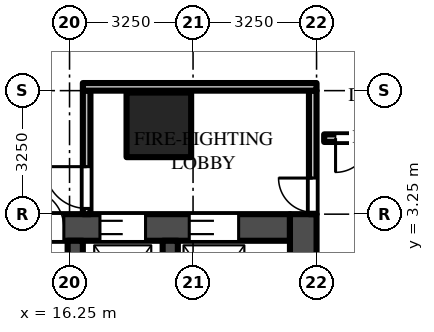
"""IFC4 building model, lengths in metres.
Left out: names, types, materials, properties, quantities, classifications, styles, units other than length and angle.
Written with IfcOpenShell. Run it as: python <this file> out.ifc"""

import sys

from ifc_helpers import new_model, si_unit, direction, frame, frame_2d, origin, origin_2d, place, context, subcontext, project, spatial, rectangle, extrude, source, transform, mapped, element, fill, save


model = new_model("IFC4")
c1 = context("Model", 3, precision=1e-05, world=origin(), true_north=direction((0.0, 1.0)))
c2 = subcontext(c1, "Body", "Model", "MODEL_VIEW")
j1 = project(units=[si_unit("LENGTHUNIT", "METRE"), si_unit("PLANEANGLEUNIT", "RADIAN")], contexts=[c1])
p1 = place(None, origin())
s1 = spatial("IfcSite", under=j1, at=p1, CompositionType="ELEMENT")
p2 = place(p1, origin())
s2 = spatial("IfcBuilding", under=s1, at=p2, CompositionType="ELEMENT")
p3 = place(p2, frame((0.0, 0.0, 8.0)))
s3 = spatial("IfcBuildingStorey", under=s2, at=p3, CompositionType="ELEMENT", Elevation=8.0)
m1 = source(origin(), c2, "Body", "SweptSolid", [
    extrude(rectangle(XDim=1.7, YDim=1.7, at=origin_2d()), origin(), (0.0, 0.0, 1.0), 6.0),
])
p4 = place(p3, frame((18.6, 5.6, 0.0), z_axis=(0.0, 0.0, 1.0), x_axis=(1.0, 0.0, 0.0)))
e1 = element("IfcColumn", 1, at=p4, inside=s3, PredefinedType="COLUMN", context=c2, shape_type="MappedRepresentation", body=[
    mapped(m1, transform((0.0, 0.0, 0.0))),
])
m2 = source(origin(), c2, "Body", "SweptSolid", [
    extrude(rectangle(XDim=14.85, YDim=0.7, at=frame_2d((7.425, 0.0))), origin(), (0.0, 0.0, 1.0), 5.7),
])
p5 = place(p3, frame((7.2, 2.9, 0.0), z_axis=(0.0, 0.0, 1.0), x_axis=(1.0, 0.0, 0.0)))
e2 = element("IfcWall", 2, at=p5, inside=s3, PredefinedType="SHEAR", context=c2, shape_type="MappedRepresentation", body=[
    mapped(m2, transform((0.0, 0.0, 0.0))),
])
m3 = source(origin(), c2, "Body", "SweptSolid", [
    extrude(rectangle(XDim=1.3, YDim=2.1, at=frame_2d((0.65, 1.05))), frame((0.0, 0.36, 0.0), z_axis=(0.0, -1.0, 0.0), x_axis=(1.0, 0.0, 0.0)), (0.0, 0.0, 1.0), 0.72),
])
p6 = place(p5, frame((12.2, 0.0, 0.0)))
e3 = element("IfcOpeningElement", 3, at=p6, cuts=e2, PredefinedType="OPENING", context=c2, shape_type="MappedRepresentation", body=[
    mapped(m3, transform((0.0, 0.0, 0.0))),
])
m4 = source(origin(), c2, "Body", "SweptSolid", [
    extrude(rectangle(XDim=1.2, YDim=2.1, at=frame_2d((0.6, 1.05))), frame((0.0, 0.36, 0.0), z_axis=(0.0, -1.0, 0.0), x_axis=(1.0, 0.0, 0.0)), (0.0, 0.0, 1.0), 0.72),
])
p7 = place(p5, frame((9.85, 0.0, 0.0)))
e4 = element("IfcOpeningElement", 4, at=p7, cuts=e2, PredefinedType="OPENING", context=c2, shape_type="MappedRepresentation", body=[
    mapped(m4, transform((0.0, 0.0, 0.0))),
])
m5 = source(origin(), c2, "Body", "SweptSolid", [
    extrude(rectangle(XDim=1.0, YDim=2.1, at=frame_2d((0.5, 1.05))), frame((0.0, 0.36, 0.0), z_axis=(0.0, -1.0, 0.0), x_axis=(1.0, 0.0, 0.0)), (0.0, 0.0, 1.0), 0.72),
])
p8 = place(p5, frame((7.9, 0.0, 0.0)))
e5 = element("IfcOpeningElement", 5, at=p8, cuts=e2, PredefinedType="OPENING", context=c2, shape_type="MappedRepresentation", body=[
    mapped(m5, transform((0.0, 0.0, 0.0))),
])
p9 = place(p5, frame((0.6, 0.0, 0.0)))
e6 = element("IfcOpeningElement", 6, at=p9, cuts=e2, PredefinedType="OPENING", context=c2, shape_type="MappedRepresentation", body=[
    mapped(m5, transform((0.0, 0.0, 0.0))),
])
m6 = source(origin(), c2, "Body", "SweptSolid", [
    extrude(rectangle(XDim=0.9, YDim=2.1, at=frame_2d((0.45, 1.05))), frame((0.0, 0.36, 0.0), z_axis=(0.0, -1.0, 0.0), x_axis=(1.0, 0.0, 0.0)), (0.0, 0.0, 1.0), 0.72),
])
p10 = place(p5, frame((3.25, 0.0, 0.0)))
e7 = element("IfcOpeningElement", 7, at=p10, cuts=e2, PredefinedType="OPENING", context=c2, shape_type="MappedRepresentation", body=[
    mapped(m6, transform((0.0, 0.0, 0.0))),
])
p11 = place(p5, frame((5.85, 0.0, 0.0)))
e8 = element("IfcOpeningElement", 8, at=p11, cuts=e2, PredefinedType="OPENING", context=c2, shape_type="MappedRepresentation", body=[
    mapped(m6, transform((0.0, 0.0, 0.0))),
])
m7 = source(origin(), c2, "Body", "SweptSolid", [
    extrude(rectangle(XDim=9.05, YDim=0.7, at=frame_2d((4.525, 0.0))), origin(), (0.0, 0.0, 1.0), 5.7),
])
p12 = place(p3, frame((22.4, -5.8, 0.0), z_axis=(0.0, 0.0, 1.0), x_axis=(0.0, 1.0, 0.0)))
e9 = element("IfcWall", 9, at=p12, inside=s3, PredefinedType="SHEAR", context=c2, shape_type="MappedRepresentation", body=[
    mapped(m7, transform((0.0, 0.0, 0.0))),
])
m8 = source(origin(), c2, "Body", "SweptSolid", [
    extrude(rectangle(XDim=2.45, YDim=0.4, at=frame_2d((1.225, 0.0))), origin(), (0.0, 0.0, 1.0), 5.7),
])
for number, where, z_axis, x_axis in (
    (10, (16.4, 0.1, 0.0), (0.0, 0.0, 1.0), (0.0, 1.0, 0.0)),
    (11, (18.9, 0.1, 0.0), (0.0, 0.0, 1.0), (0.0, 1.0, 0.0)),
):
    element("IfcWall", number, at=place(p3, frame(where, z_axis=z_axis, x_axis=x_axis)), inside=s3, PredefinedType="SHEAR", context=c2, shape_type="MappedRepresentation", body=[
        mapped(m8, transform((0.0, 0.0, 0.0))),
    ])
m9 = source(origin(), c2, "Body", "SweptSolid", [
    extrude(rectangle(XDim=3.25, YDim=0.2, at=frame_2d((1.625, 0.0))), origin(), (0.0, 0.0, 1.0), 5.7),
])
p13 = place(p3, frame((16.7, 3.25, 0.0), z_axis=(0.0, 0.0, 1.0), x_axis=(0.0, 1.0, 0.0)))
e12 = element("IfcWall", 12, at=p13, inside=s3, PredefinedType="PARTITIONING", context=c2, shape_type="MappedRepresentation", body=[
    mapped(m9, transform((0.0, 0.0, 0.0))),
])
m10 = source(origin(), c2, "Body", "SweptSolid", [
    extrude(rectangle(XDim=1.1, YDim=2.1, at=frame_2d((0.55, 1.05))), frame((0.0, 0.11, 0.0), z_axis=(0.0, -1.0, 0.0), x_axis=(1.0, 0.0, 0.0)), (0.0, 0.0, 1.0), 0.22),
])
p14 = place(p13, frame((0.15, 0.0, 0.0)))
e13 = element("IfcOpeningElement", 13, at=p14, cuts=e12, PredefinedType="OPENING", context=c2, shape_type="MappedRepresentation", body=[
    mapped(m10, transform((0.0, 0.0, 0.0))),
])
p15 = place(p3, frame((22.65, 3.25, 0.0), z_axis=(0.0, 0.0, 1.0), x_axis=(0.0, 1.0, 0.0)))
e14 = element("IfcWall", 14, at=p15, inside=s3, PredefinedType="PARTITIONING", context=c2, shape_type="MappedRepresentation", body=[
    mapped(m9, transform((0.0, 0.0, 0.0))),
])
m11 = source(origin(), c2, "Body", "SweptSolid", [
    extrude(rectangle(XDim=0.9, YDim=2.1, at=frame_2d((0.45, 1.05))), frame((0.0, 0.11, 0.0), z_axis=(0.0, -1.0, 0.0), x_axis=(1.0, 0.0, 0.0)), (0.0, 0.0, 1.0), 0.22),
])
p16 = place(p15, frame((0.05, 0.0, 0.0)))
e15 = element("IfcOpeningElement", 15, at=p16, cuts=e14, PredefinedType="OPENING", context=c2, shape_type="MappedRepresentation", body=[
    mapped(m11, transform((0.0, 0.0, 0.0))),
])
m12 = source(origin(), c2, "Body", "SweptSolid", [
    extrude(rectangle(XDim=6.15, YDim=0.2, at=frame_2d((3.075, 0.0))), origin(), (0.0, 0.0, 1.0), 5.7),
])
p17 = place(p3, frame((16.6, 6.6, 0.0), z_axis=(0.0, 0.0, 1.0), x_axis=(1.0, 0.0, 0.0)))
e16 = element("IfcWall", 16, at=p17, inside=s3, PredefinedType="PARTITIONING", context=c2, shape_type="MappedRepresentation", body=[
    mapped(m12, transform((0.0, 0.0, 0.0))),
])
m13 = source(origin(), c2, "Body", "SweptSolid", [
    extrude(rectangle(XDim=2.5, YDim=0.2, at=frame_2d((1.25, 0.0))), origin(), (0.0, 0.0, 1.0), 5.7),
])
p18 = place(p3, frame((25.45, 5.25, 0.0), z_axis=(0.0, 0.0, 1.0), x_axis=(-1.0, 0.0, 0.0)))
e17 = element("IfcWall", 17, at=p18, inside=s3, PredefinedType="PARTITIONING", context=c2, shape_type="MappedRepresentation", body=[
    mapped(m13, transform((0.0, 0.0, 0.0))),
])
m14 = source(origin(), c2, "Body", "SweptSolid", [
    extrude(rectangle(XDim=1.8, YDim=2.1, at=frame_2d((0.9, 1.05))), frame((0.0, 0.11, 0.0), z_axis=(0.0, -1.0, 0.0), x_axis=(1.0, 0.0, 0.0)), (0.0, 0.0, 1.0), 0.22),
])
p19 = place(p18, frame((0.4, 0.0, 0.0)))
e18 = element("IfcOpeningElement", 18, at=p19, cuts=e17, PredefinedType="OPENING", context=c2, shape_type="MappedRepresentation", body=[
    mapped(m14, transform((0.0, 0.0, 0.0))),
])
m15 = source(origin(), c2, "Body", "SweptSolid", [
    extrude(rectangle(XDim=1.3, YDim=2.1, at=frame_2d((0.65, 1.05))), frame((0.0, -0.275, 0.0), z_axis=(0.0, -1.0, 0.0), x_axis=(1.0, 0.0, 0.0)), (0.0, 0.0, 1.0), 0.05),
])
p20 = place(p6, origin())
e19 = element("IfcDoor", 19, at=p20, inside=s3, OperationType="DOUBLE_DOOR_SLIDING", PredefinedType="DOOR", context=c2, shape_type="MappedRepresentation", body=[
    mapped(m15, transform((0.0, 0.0, 0.0))),
])
fill(e3, e19)
m16 = source(origin(), c2, "Body", "SweptSolid", [
    extrude(rectangle(XDim=1.2, YDim=2.1, at=frame_2d((0.6, 1.05))), frame((0.0, -0.275, 0.0), z_axis=(0.0, -1.0, 0.0), x_axis=(1.0, 0.0, 0.0)), (0.0, 0.0, 1.0), 0.05),
])
p21 = place(p7, origin())
e20 = element("IfcDoor", 20, at=p21, inside=s3, OperationType="DOUBLE_DOOR_SLIDING", PredefinedType="DOOR", context=c2, shape_type="MappedRepresentation", body=[
    mapped(m16, transform((0.0, 0.0, 0.0))),
])
fill(e4, e20)
m17 = source(origin(), c2, "Body", "SweptSolid", [
    extrude(rectangle(XDim=1.0, YDim=2.1, at=frame_2d((0.5, 1.05))), frame((0.0, -0.275, 0.0), z_axis=(0.0, -1.0, 0.0), x_axis=(1.0, 0.0, 0.0)), (0.0, 0.0, 1.0), 0.05),
])
p22 = place(p8, origin())
e21 = element("IfcDoor", 21, at=p22, inside=s3, OperationType="SINGLE_SWING_LEFT", PredefinedType="DOOR", context=c2, shape_type="MappedRepresentation", body=[
    mapped(m17, transform((0.0, 0.0, 0.0))),
])
fill(e5, e21)
m18 = source(origin(), c2, "Body", "SweptSolid", [
    extrude(rectangle(XDim=1.1, YDim=2.1, at=frame_2d((0.55, 1.05))), frame((0.0, 0.025, 0.0), z_axis=(0.0, -1.0, 0.0), x_axis=(1.0, 0.0, 0.0)), (0.0, 0.0, 1.0), 0.05),
])
p23 = place(p14, origin())
e22 = element("IfcDoor", 22, at=p23, inside=s3, OperationType="SINGLE_SWING_RIGHT", PredefinedType="DOOR", context=c2, shape_type="MappedRepresentation", body=[
    mapped(m18, transform((0.0, 0.0, 0.0))),
])
fill(e13, e22)
m19 = source(origin(), c2, "Body", "SweptSolid", [
    extrude(rectangle(XDim=0.9, YDim=2.1, at=frame_2d((0.45, 1.05))), frame((0.0, 0.025, 0.0), z_axis=(0.0, -1.0, 0.0), x_axis=(1.0, 0.0, 0.0)), (0.0, 0.0, 1.0), 0.05),
])
p24 = place(p16, origin())
e23 = element("IfcDoor", 23, at=p24, inside=s3, OperationType="SINGLE_SWING_RIGHT", PredefinedType="DOOR", context=c2, shape_type="MappedRepresentation", body=[
    mapped(m19, transform((0.0, 0.0, 0.0))),
])
fill(e15, e23)
m20 = source(origin(), c2, "Body", "SweptSolid", [
    extrude(rectangle(XDim=1.8, YDim=2.1, at=frame_2d((0.9, 1.05))), frame((0.0, 0.025, 0.0), z_axis=(0.0, -1.0, 0.0), x_axis=(1.0, 0.0, 0.0)), (0.0, 0.0, 1.0), 0.05),
])
p25 = place(p19, origin())
e24 = element("IfcDoor", 24, at=p25, inside=s3, OperationType="DOUBLE_DOOR_SINGLE_SWING", PredefinedType="DOOR", context=c2, shape_type="MappedRepresentation", body=[
    mapped(m20, transform((0.0, 0.0, 0.0))),
])
fill(e18, e24)
save(model, sys.argv[1])
